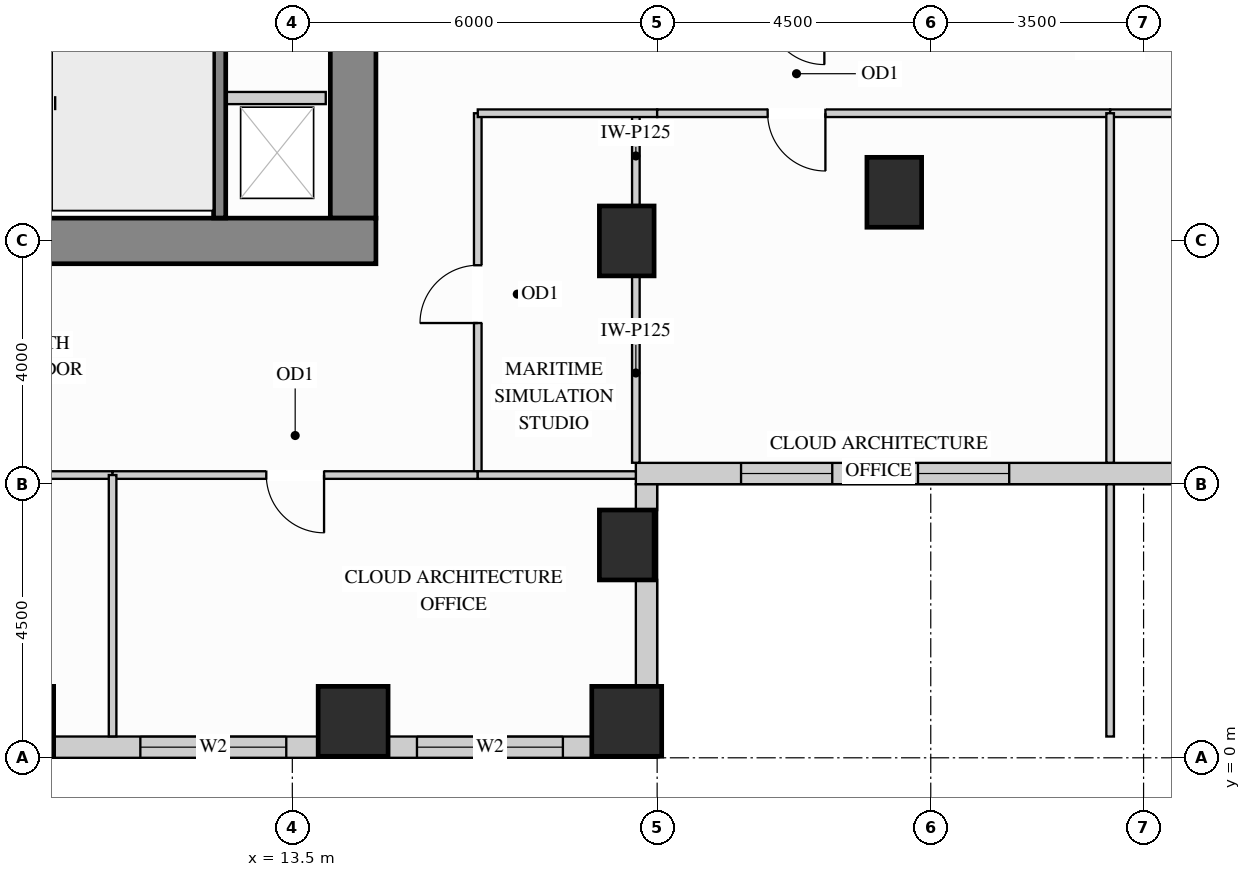
"""IFC4 building model, lengths in metres.
Left out: names, types, materials, properties, quantities, classifications, styles, units other than length and angle.
Written with IfcOpenShell. Run it as: python <this file> out.ifc"""

import sys

from ifc_helpers import new_model, si_unit, direction, frame, frame_2d, origin, origin_2d, place, context, subcontext, project, spatial, rectangle, extrude, source, transform, mapped, element, fill, save


model = new_model("IFC4")
c1 = context("Model", 3, precision=1e-05, world=origin(), true_north=direction((0.0, 1.0)))
c2 = subcontext(c1, "Body", "Model", "MODEL_VIEW")
j1 = project(units=[si_unit("LENGTHUNIT", "METRE"), si_unit("PLANEANGLEUNIT", "RADIAN")], contexts=[c1])
p1 = place(None, origin())
s1 = spatial("IfcSite", under=j1, at=p1, CompositionType="ELEMENT")
p2 = place(p1, origin())
s2 = spatial("IfcBuilding", under=s1, at=p2, CompositionType="ELEMENT")
p3 = place(p2, frame((0.0, 0.0, 77.4)))
s3 = spatial("IfcBuildingStorey", under=s2, at=p3, CompositionType="ELEMENT", Elevation=77.4)
m1 = source(origin(), c2, "Body", "SweptSolid", [
    extrude(rectangle(XDim=0.9, YDim=1.15, at=origin_2d()), origin(), (0.0, 0.0, 1.0), 3.38),
])
for number, where, z_axis, x_axis in (
    (1, (19.0, 3.5, 0.0), (0.0, 0.0, 1.0), (1.0, 0.0, 0.0)),
    (2, (19.0, 8.5, 0.0), (0.0, 0.0, 1.0), (1.0, 0.0, 0.0)),
    (3, (23.4, 9.3, 0.0), (0.0, 0.0, 1.0), (1.0, 0.0, 0.0)),
):
    element("IfcColumn", number, at=place(p3, frame(where, z_axis=z_axis, x_axis=x_axis)), inside=s3, PredefinedType="COLUMN", context=c2, shape_type="MappedRepresentation", body=[
        mapped(m1, transform((0.0, 0.0, 0.0), x_axis=(1.0, 0.0, 0.0), y_axis=(0.0, 1.0, 0.0), z_axis=(0.0, 0.0, 1.0))),
    ])
m2 = source(origin(), c2, "Body", "SweptSolid", [
    extrude(rectangle(XDim=1.15, YDim=1.15, at=origin_2d()), origin(), (0.0, 0.0, 1.0), 3.38),
])
for number, where, z_axis, x_axis in (
    (4, (14.5, 0.6, 0.0), (0.0, 0.0, 1.0), (1.0, 0.0, 0.0)),
    (5, (19.0, 0.6, 0.0), (0.0, 0.0, 1.0), (1.0, 0.0, 0.0)),
    (6, (9.0, 0.6, 0.0), (0.0, 0.0, 1.0), (1.0, 0.0, 0.0)),
):
    element("IfcColumn", number, at=place(p3, frame(where, z_axis=z_axis, x_axis=x_axis)), inside=s3, PredefinedType="COLUMN", context=c2, shape_type="MappedRepresentation", body=[
        mapped(m2, transform((0.0, 0.0, 0.0), x_axis=(1.0, 0.0, 0.0), y_axis=(0.0, 1.0, 0.0), z_axis=(0.0, 0.0, 1.0))),
    ])
m3 = source(origin(), c2, "Body", "SweptSolid", [
    extrude(rectangle(XDim=9.945, YDim=0.75, at=frame_2d((4.973, 0.0))), origin(), (0.0, 0.0, 1.0), 3.38),
])
p4 = place(p3, frame((14.5, 8.875, 0.0), z_axis=(0.0, 0.0, 1.0), x_axis=(0.0, 1.0, 0.0)))
e7 = element("IfcWall", 7, at=p4, inside=s3, PredefinedType="SHEAR", context=c2, shape_type="MappedRepresentation", body=[
    mapped(m3, transform((0.0, 0.0, 0.0), x_axis=(1.0, 0.0, 0.0), y_axis=(0.0, 1.0, 0.0), z_axis=(0.0, 0.0, 1.0))),
])
m4 = source(origin(), c2, "Body", "SweptSolid", [
    extrude(rectangle(XDim=10.75, YDim=0.75, at=frame_2d((5.375, 0.0))), origin(), (0.0, 0.0, 1.0), 3.38),
])
p5 = place(p3, frame((4.125, 8.5, 0.0), z_axis=(0.0, 0.0, 1.0), x_axis=(1.0, 0.0, 0.0)))
e8 = element("IfcWall", 8, at=p5, inside=s3, PredefinedType="SHEAR", context=c2, shape_type="MappedRepresentation", body=[
    mapped(m4, transform((0.0, 0.0, 0.0), x_axis=(1.0, 0.0, 0.0), y_axis=(0.0, 1.0, 0.0), z_axis=(0.0, 0.0, 1.0))),
])
p6 = place(p3, frame((9.573, 0.175, 0.0), z_axis=(0.0, 0.0, 1.0), x_axis=(1.0, 0.0, 0.0)))
e9 = element("IfcWall", 9, at=p6, inside=s3, PredefinedType="SOLIDWALL", context=c2, shape_type="SweptSolid", body=[
    extrude(rectangle(XDim=4.354, YDim=0.35, at=frame_2d((2.177, 0.0))), origin(), (0.0, 0.0, 1.0), 3.365),
])
p7 = place(p6, frame((1.427, 0.0, 0.78)))
e10 = element("IfcOpeningElement", 10, at=p7, cuts=e9, PredefinedType="OPENING", context=c2, shape_type="SweptSolid", body=[
    extrude(rectangle(XDim=2.4, YDim=2.1, at=frame_2d((1.2, 1.05))), frame((0.0, 0.185, 0.0), z_axis=(0.0, -1.0, 0.0), x_axis=(1.0, 0.0, 0.0)), (0.0, 0.0, 1.0), 0.37),
])
p8 = place(p3, frame((15.073, 0.175, 0.0), z_axis=(0.0, 0.0, 1.0), x_axis=(1.0, 0.0, 0.0)))
e11 = element("IfcWall", 11, at=p8, inside=s3, PredefinedType="SOLIDWALL", context=c2, shape_type="SweptSolid", body=[
    extrude(rectangle(XDim=3.354, YDim=0.35, at=frame_2d((1.677, 0.0))), origin(), (0.0, 0.0, 1.0), 3.365),
])
p9 = place(p8, frame((0.477, 0.0, 0.78)))
e12 = element("IfcOpeningElement", 12, at=p9, cuts=e11, PredefinedType="OPENING", context=c2, shape_type="SweptSolid", body=[
    extrude(rectangle(XDim=2.4, YDim=2.1, at=frame_2d((1.2, 1.05))), frame((0.0, 0.185, 0.0), z_axis=(0.0, -1.0, 0.0), x_axis=(1.0, 0.0, 0.0)), (0.0, 0.0, 1.0), 0.37),
])
m5 = source(origin(), c2, "Body", "SweptSolid", [
    extrude(rectangle(XDim=1.754, YDim=0.35, at=frame_2d((0.877, 0.0))), origin(), (0.0, 0.0, 1.0), 2.519),
])
p10 = place(p3, frame((19.325, 1.173, 0.0), z_axis=(0.0, 0.0, 1.0), x_axis=(0.0, 1.0, 0.0)))
e13 = element("IfcWall", 13, at=p10, inside=s3, PredefinedType="SOLIDWALL", context=c2, shape_type="MappedRepresentation", body=[
    mapped(m5, transform((0.0, 0.0, 0.0), x_axis=(1.0, 0.0, 0.0), y_axis=(0.0, 1.0, 0.0), z_axis=(0.0, 0.0, 1.0))),
])
m6 = source(origin(), c2, "Body", "SweptSolid", [
    extrude(rectangle(XDim=0.429, YDim=0.35, at=frame_2d((0.214, 0.0))), origin(), (0.0, 0.0, 1.0), 2.677),
])
p11 = place(p3, frame((19.325, 4.073, 0.0), z_axis=(0.0, 0.0, 1.0), x_axis=(0.0, 1.0, 0.0)))
e14 = element("IfcWall", 14, at=p11, inside=s3, PredefinedType="SOLIDWALL", context=c2, shape_type="MappedRepresentation", body=[
    mapped(m6, transform((0.0, 0.0, 0.0), x_axis=(1.0, 0.0, 0.0), y_axis=(0.0, 1.0, 0.0), z_axis=(0.0, 0.0, 1.0))),
])
p12 = place(p3, frame((19.15, 4.675, 0.0), z_axis=(0.0, 0.0, 1.0), x_axis=(1.0, 0.0, 0.0)))
e15 = element("IfcWall", 15, at=p12, inside=s3, PredefinedType="SOLIDWALL", context=c2, shape_type="SweptSolid", body=[
    extrude(rectangle(XDim=15.6, YDim=0.35, at=frame_2d((7.8, 0.0))), origin(), (0.0, 0.0, 1.0), 3.365),
])
p13 = place(p12, frame((1.73, 0.0, 0.78)))
e16 = element("IfcOpeningElement", 16, at=p13, cuts=e15, PredefinedType="OPENING", context=c2, shape_type="SweptSolid", body=[
    extrude(rectangle(XDim=1.5, YDim=2.0, at=frame_2d((0.75, 1.0))), frame((0.0, 0.185, 0.0), z_axis=(0.0, -1.0, 0.0), x_axis=(1.0, 0.0, 0.0)), (0.0, 0.0, 1.0), 0.37),
])
p14 = place(p12, frame((4.64, 0.0, 0.78)))
e17 = element("IfcOpeningElement", 17, at=p14, cuts=e15, PredefinedType="OPENING", context=c2, shape_type="SweptSolid", body=[
    extrude(rectangle(XDim=1.5, YDim=2.0, at=frame_2d((0.75, 1.0))), frame((0.0, 0.185, 0.0), z_axis=(0.0, -1.0, 0.0), x_axis=(1.0, 0.0, 0.0)), (0.0, 0.0, 1.0), 0.37),
])
p15 = place(p12, frame((9.46, 0.0, 0.78)))
e18 = element("IfcOpeningElement", 18, at=p15, cuts=e15, PredefinedType="OPENING", context=c2, shape_type="SweptSolid", body=[
    extrude(rectangle(XDim=1.5, YDim=2.0, at=frame_2d((0.75, 1.0))), frame((0.0, 0.185, 0.0), z_axis=(0.0, -1.0, 0.0), x_axis=(1.0, 0.0, 0.0)), (0.0, 0.0, 1.0), 0.37),
])
p16 = place(p12, frame((12.37, 0.0, 0.78)))
e19 = element("IfcOpeningElement", 19, at=p16, cuts=e15, PredefinedType="OPENING", context=c2, shape_type="SweptSolid", body=[
    extrude(rectangle(XDim=1.5, YDim=2.0, at=frame_2d((0.75, 1.0))), frame((0.0, 0.185, 0.0), z_axis=(0.0, -1.0, 0.0), x_axis=(1.0, 0.0, 0.0)), (0.0, 0.0, 1.0), 0.37),
])
m7 = source(origin(), c2, "Body", "SweptSolid", [
    extrude(rectangle(XDim=3.058, YDim=0.125, at=frame_2d((1.529, 0.0))), origin(), (0.0, 0.0, 1.0), 2.677),
])
p17 = place(p3, frame((19.15, 4.852, 0.0), z_axis=(0.0, 0.0, 1.0), x_axis=(0.0, 1.0, 0.0)))
e20 = element("IfcWall", 20, at=p17, inside=s3, PredefinedType="PARTITIONING", context=c2, shape_type="MappedRepresentation", body=[
    mapped(m7, transform((0.0, 0.0, 0.0), x_axis=(1.0, 0.0, 0.0), y_axis=(0.0, 1.0, 0.0), z_axis=(0.0, 0.0, 1.0))),
])
m8 = source(origin(), c2, "Body", "SweptSolid", [
    extrude(rectangle(XDim=1.51, YDim=0.125, at=frame_2d((0.755, 0.0))), origin(), (0.0, 0.0, 1.0), 2.677),
])
p18 = place(p3, frame((19.15, 9.09, 0.0), z_axis=(0.0, 0.0, 1.0), x_axis=(0.0, 1.0, 0.0)))
e21 = element("IfcWall", 21, at=p18, inside=s3, PredefinedType="PARTITIONING", context=c2, shape_type="MappedRepresentation", body=[
    mapped(m8, transform((0.0, 0.0, 0.0), x_axis=(1.0, 0.0, 0.0), y_axis=(0.0, 1.0, 0.0), z_axis=(0.0, 0.0, 1.0))),
])
p19 = place(p3, frame((16.55, 4.65, 0.0), z_axis=(0.0, 0.0, 1.0), x_axis=(0.0, 1.0, 0.0)))
e22 = element("IfcWall", 22, at=p19, inside=s3, PredefinedType="PARTITIONING", context=c2, shape_type="SweptSolid", body=[
    extrude(rectangle(XDim=5.95, YDim=0.125, at=frame_2d((2.975, 0.0))), origin(), (0.0, 0.0, 1.0), 3.365),
])
p20 = place(p19, frame((2.5, 0.0, 0.0)))
e23 = element("IfcOpeningElement", 23, at=p20, cuts=e22, PredefinedType="OPENING", context=c2, shape_type="SweptSolid", body=[
    extrude(rectangle(XDim=0.95, YDim=2.15, at=frame_2d((0.475, 1.075))), frame((0.0, 0.073, 0.0), z_axis=(0.0, -1.0, 0.0), x_axis=(1.0, 0.0, 0.0)), (0.0, 0.0, 1.0), 0.145),
])
m9 = source(origin(), c2, "Body", "SweptSolid", [
    extrude(rectangle(XDim=2.95, YDim=0.125, at=frame_2d((1.475, 0.0))), origin(), (0.0, 0.0, 1.0), 3.365),
])
p21 = place(p3, frame((16.55, 10.6, 0.0), z_axis=(0.0, 0.0, 1.0), x_axis=(1.0, 0.0, 0.0)))
e24 = element("IfcWall", 24, at=p21, inside=s3, PredefinedType="PARTITIONING", context=c2, shape_type="MappedRepresentation", body=[
    mapped(m9, transform((0.0, 0.0, 0.0), x_axis=(1.0, 0.0, 0.0), y_axis=(0.0, 1.0, 0.0), z_axis=(0.0, 0.0, 1.0))),
])
p22 = place(p3, frame((19.5, 10.6, 0.0), z_axis=(0.0, 0.0, 1.0), x_axis=(1.0, 0.0, 0.0)))
e25 = element("IfcWall", 25, at=p22, inside=s3, PredefinedType="PARTITIONING", context=c2, shape_type="SweptSolid", body=[
    extrude(rectangle(XDim=7.45, YDim=0.125, at=frame_2d((3.725, 0.0))), origin(), (0.0, 0.0, 1.0), 3.365),
])
p23 = place(p22, frame((1.817, 0.0, 0.0)))
e26 = element("IfcOpeningElement", 26, at=p23, cuts=e25, PredefinedType="OPENING", context=c2, shape_type="SweptSolid", body=[
    extrude(rectangle(XDim=0.95, YDim=2.15, at=frame_2d((0.475, 1.075))), frame((0.0, 0.073, 0.0), z_axis=(0.0, -1.0, 0.0), x_axis=(1.0, 0.0, 0.0)), (0.0, 0.0, 1.0), 0.145),
])
p24 = place(p3, frame((26.95, 10.6, 0.0), z_axis=(0.0, 0.0, 1.0), x_axis=(1.0, 0.0, 0.0)))
e27 = element("IfcWall", 27, at=p24, inside=s3, PredefinedType="PARTITIONING", context=c2, shape_type="SweptSolid", body=[
    extrude(rectangle(XDim=7.45, YDim=0.125, at=frame_2d((3.725, 0.0))), origin(), (0.0, 0.0, 1.0), 3.365),
])
p25 = place(p24, frame((4.683, 0.0, 0.0)))
e28 = element("IfcOpeningElement", 28, at=p25, cuts=e27, PredefinedType="OPENING", context=c2, shape_type="SweptSolid", body=[
    extrude(rectangle(XDim=0.95, YDim=2.15, at=frame_2d((0.475, 1.075))), frame((0.0, 0.073, 0.0), z_axis=(0.0, -1.0, 0.0), x_axis=(1.0, 0.0, 0.0)), (0.0, 0.0, 1.0), 0.145),
])
m10 = source(origin(), c2, "Body", "SweptSolid", [
    extrude(rectangle(XDim=4.148, YDim=0.125, at=frame_2d((2.074, 0.0))), origin(), (0.0, 0.0, 1.0), 3.365),
])
p26 = place(p3, frame((26.95, 0.35, 0.0), z_axis=(0.0, 0.0, 1.0), x_axis=(0.0, 1.0, 0.0)))
e29 = element("IfcWall", 29, at=p26, inside=s3, PredefinedType="PARTITIONING", context=c2, shape_type="MappedRepresentation", body=[
    mapped(m10, transform((0.0, 0.0, 0.0), x_axis=(1.0, 0.0, 0.0), y_axis=(0.0, 1.0, 0.0), z_axis=(0.0, 0.0, 1.0))),
])
m11 = source(origin(), c2, "Body", "SweptSolid", [
    extrude(rectangle(XDim=5.748, YDim=0.125, at=frame_2d((2.874, 0.0))), origin(), (0.0, 0.0, 1.0), 3.365),
])
p27 = place(p3, frame((26.95, 4.852, 0.0), z_axis=(0.0, 0.0, 1.0), x_axis=(0.0, 1.0, 0.0)))
e30 = element("IfcWall", 30, at=p27, inside=s3, PredefinedType="PARTITIONING", context=c2, shape_type="MappedRepresentation", body=[
    mapped(m11, transform((0.0, 0.0, 0.0), x_axis=(1.0, 0.0, 0.0), y_axis=(0.0, 1.0, 0.0), z_axis=(0.0, 0.0, 1.0))),
])
p28 = place(p3, frame((2.45, 4.65, 0.0), z_axis=(0.0, 0.0, 1.0), x_axis=(1.0, 0.0, 0.0)))
e31 = element("IfcWall", 31, at=p28, inside=s3, PredefinedType="PARTITIONING", context=c2, shape_type="SweptSolid", body=[
    extrude(rectangle(XDim=8.094, YDim=0.125, at=frame_2d((4.047, 0.0))), origin(), (0.0, 0.0, 1.0), 2.828),
])
p29 = place(p28, frame((3.572, 0.0, 0.0)))
e32 = element("IfcOpeningElement", 32, at=p29, cuts=e31, PredefinedType="OPENING", context=c2, shape_type="SweptSolid", body=[
    extrude(rectangle(XDim=0.95, YDim=2.15, at=frame_2d((0.475, 1.075))), frame((0.0, 0.073, 0.0), z_axis=(0.0, -1.0, 0.0), x_axis=(1.0, 0.0, 0.0)), (0.0, 0.0, 1.0), 0.145),
])
p30 = place(p3, frame((10.544, 4.65, 0.0), z_axis=(0.0, 0.0, 1.0), x_axis=(1.0, 0.0, 0.0)))
e33 = element("IfcWall", 33, at=p30, inside=s3, PredefinedType="PARTITIONING", context=c2, shape_type="SweptSolid", body=[
    extrude(rectangle(XDim=6.006, YDim=0.125, at=frame_2d((3.003, 0.0))), origin(), (0.0, 0.0, 1.0), 2.828),
])
p31 = place(p30, frame((2.528, 0.0, 0.0)))
e34 = element("IfcOpeningElement", 34, at=p31, cuts=e33, PredefinedType="OPENING", context=c2, shape_type="SweptSolid", body=[
    extrude(rectangle(XDim=0.95, YDim=2.15, at=frame_2d((0.475, 1.075))), frame((0.0, 0.073, 0.0), z_axis=(0.0, -1.0, 0.0), x_axis=(1.0, 0.0, 0.0)), (0.0, 0.0, 1.0), 0.145),
])
m12 = source(origin(), c2, "Body", "SweptSolid", [
    extrude(rectangle(XDim=2.6, YDim=0.125, at=frame_2d((1.3, 0.0))), origin(), (0.0, 0.0, 1.0), 2.828),
])
p32 = place(p3, frame((16.55, 4.65, 0.0), z_axis=(0.0, 0.0, 1.0), x_axis=(1.0, 0.0, 0.0)))
e35 = element("IfcWall", 35, at=p32, inside=s3, PredefinedType="PARTITIONING", context=c2, shape_type="MappedRepresentation", body=[
    mapped(m12, transform((0.0, 0.0, 0.0), x_axis=(1.0, 0.0, 0.0), y_axis=(0.0, 1.0, 0.0), z_axis=(0.0, 0.0, 1.0))),
])
m13 = source(origin(), c2, "Body", "SweptSolid", [
    extrude(rectangle(XDim=4.298, YDim=0.125, at=frame_2d((2.149, 0.0))), origin(), (0.0, 0.0, 1.0), 3.365),
])
p33 = place(p3, frame((10.544, 0.352, 0.0), z_axis=(0.0, 0.0, 1.0), x_axis=(0.0, 1.0, 0.0)))
e36 = element("IfcWall", 36, at=p33, inside=s3, PredefinedType="PARTITIONING", context=c2, shape_type="MappedRepresentation", body=[
    mapped(m13, transform((0.0, 0.0, 0.0), x_axis=(1.0, 0.0, 0.0), y_axis=(0.0, 1.0, 0.0), z_axis=(0.0, 0.0, 1.0))),
])
m14 = source(origin(), c2, "Body", "SweptSolid", [
    extrude(rectangle(XDim=1.63, YDim=0.2, at=frame_2d((0.815, 0.0))), origin(), (0.0, 0.0, 1.0), 3.365),
])
p34 = place(p3, frame((12.42, 10.85, 0.0), z_axis=(0.0, 0.0, 1.0), x_axis=(1.0, 0.0, 0.0)))
e37 = element("IfcWall", 37, at=p34, inside=s3, PredefinedType="PARTITIONING", context=c2, shape_type="MappedRepresentation", body=[
    mapped(m14, transform((0.0, 0.0, 0.0), x_axis=(1.0, 0.0, 0.0), y_axis=(0.0, 1.0, 0.0), z_axis=(0.0, 0.0, 1.0))),
])
m15 = source(origin(), c2, "Body", "SweptSolid", [
    extrude(rectangle(XDim=3.678, YDim=0.2, at=frame_2d((1.839, 0.0))), origin(), (0.0, 0.0, 1.0), 3.38),
])
p35 = place(p3, frame((12.305, 8.877, 0.0), z_axis=(0.0, 0.0, 1.0), x_axis=(0.0, 1.0, 0.0)))
e38 = element("IfcWall", 38, at=p35, inside=s3, PredefinedType="SHEAR", context=c2, shape_type="MappedRepresentation", body=[
    mapped(m15, transform((0.0, 0.0, 0.0), x_axis=(1.0, 0.0, 0.0), y_axis=(0.0, 1.0, 0.0), z_axis=(0.0, 0.0, 1.0))),
])
m16 = source(origin(), c2, "Body", "SweptSolid", [
    extrude(rectangle(XDim=0.95, YDim=2.15, at=frame_2d((0.475, 1.075))), frame((0.0, 0.025, 0.0), z_axis=(0.0, -1.0, 0.0), x_axis=(1.0, 0.0, 0.0)), (0.0, 0.0, 1.0), 0.05),
])
p36 = place(p20, origin())
e39 = element("IfcDoor", 39, at=p36, inside=s3, OperationType="SINGLE_SWING_LEFT", PredefinedType="DOOR", context=c2, shape_type="MappedRepresentation", body=[
    mapped(m16, transform((0.0, 0.0, 0.0), x_axis=(1.0, 0.0, 0.0), y_axis=(0.0, 1.0, 0.0), z_axis=(0.0, 0.0, 1.0))),
])
fill(e23, e39)
p37 = place(p31, origin())
e40 = element("IfcDoor", 40, at=p37, inside=s3, OperationType="SINGLE_SWING_RIGHT", PredefinedType="DOOR", context=c2, shape_type="MappedRepresentation", body=[
    mapped(m16, transform((0.0, 0.0, 0.0), x_axis=(1.0, 0.0, 0.0), y_axis=(0.0, 1.0, 0.0), z_axis=(0.0, 0.0, 1.0))),
])
fill(e34, e40)
p38 = place(p23, origin())
e41 = element("IfcDoor", 41, at=p38, inside=s3, OperationType="SINGLE_SWING_RIGHT", PredefinedType="DOOR", context=c2, shape_type="MappedRepresentation", body=[
    mapped(m16, transform((0.0, 0.0, 0.0), x_axis=(1.0, 0.0, 0.0), y_axis=(0.0, 1.0, 0.0), z_axis=(0.0, 0.0, 1.0))),
])
fill(e26, e41)
m17 = source(origin(), c2, "Body", "SweptSolid", [
    extrude(rectangle(XDim=2.4, YDim=2.1, at=frame_2d((1.2, 1.05))), frame((0.0, 0.03, 0.0), z_axis=(0.0, -1.0, 0.0), x_axis=(1.0, 0.0, 0.0)), (0.0, 0.0, 1.0), 0.06),
])
p39 = place(p7, origin())
e42 = element("IfcWindow", 42, at=p39, inside=s3, PartitioningType="SINGLE_PANEL", PredefinedType="WINDOW", context=c2, shape_type="MappedRepresentation", body=[
    mapped(m17, transform((0.0, 0.0, 0.0), x_axis=(1.0, 0.0, 0.0), y_axis=(0.0, 1.0, 0.0), z_axis=(0.0, 0.0, 1.0))),
])
fill(e10, e42)
p40 = place(p9, origin())
e43 = element("IfcWindow", 43, at=p40, inside=s3, PartitioningType="SINGLE_PANEL", PredefinedType="WINDOW", context=c2, shape_type="MappedRepresentation", body=[
    mapped(m17, transform((0.0, 0.0, 0.0), x_axis=(1.0, 0.0, 0.0), y_axis=(0.0, 1.0, 0.0), z_axis=(0.0, 0.0, 1.0))),
])
fill(e12, e43)
m18 = source(origin(), c2, "Body", "SweptSolid", [
    extrude(rectangle(XDim=1.5, YDim=2.0, at=frame_2d((0.75, 1.0))), frame((0.0, 0.03, 0.0), z_axis=(0.0, -1.0, 0.0), x_axis=(1.0, 0.0, 0.0)), (0.0, 0.0, 1.0), 0.06),
])
p41 = place(p13, origin())
e44 = element("IfcWindow", 44, at=p41, inside=s3, PartitioningType="SINGLE_PANEL", PredefinedType="WINDOW", context=c2, shape_type="MappedRepresentation", body=[
    mapped(m18, transform((0.0, 0.0, 0.0), x_axis=(1.0, 0.0, 0.0), y_axis=(0.0, 1.0, 0.0), z_axis=(0.0, 0.0, 1.0))),
])
fill(e16, e44)
p42 = place(p14, origin())
e45 = element("IfcWindow", 45, at=p42, inside=s3, PartitioningType="SINGLE_PANEL", PredefinedType="WINDOW", context=c2, shape_type="MappedRepresentation", body=[
    mapped(m18, transform((0.0, 0.0, 0.0), x_axis=(1.0, 0.0, 0.0), y_axis=(0.0, 1.0, 0.0), z_axis=(0.0, 0.0, 1.0))),
])
fill(e17, e45)
save(model, sys.argv[1])
